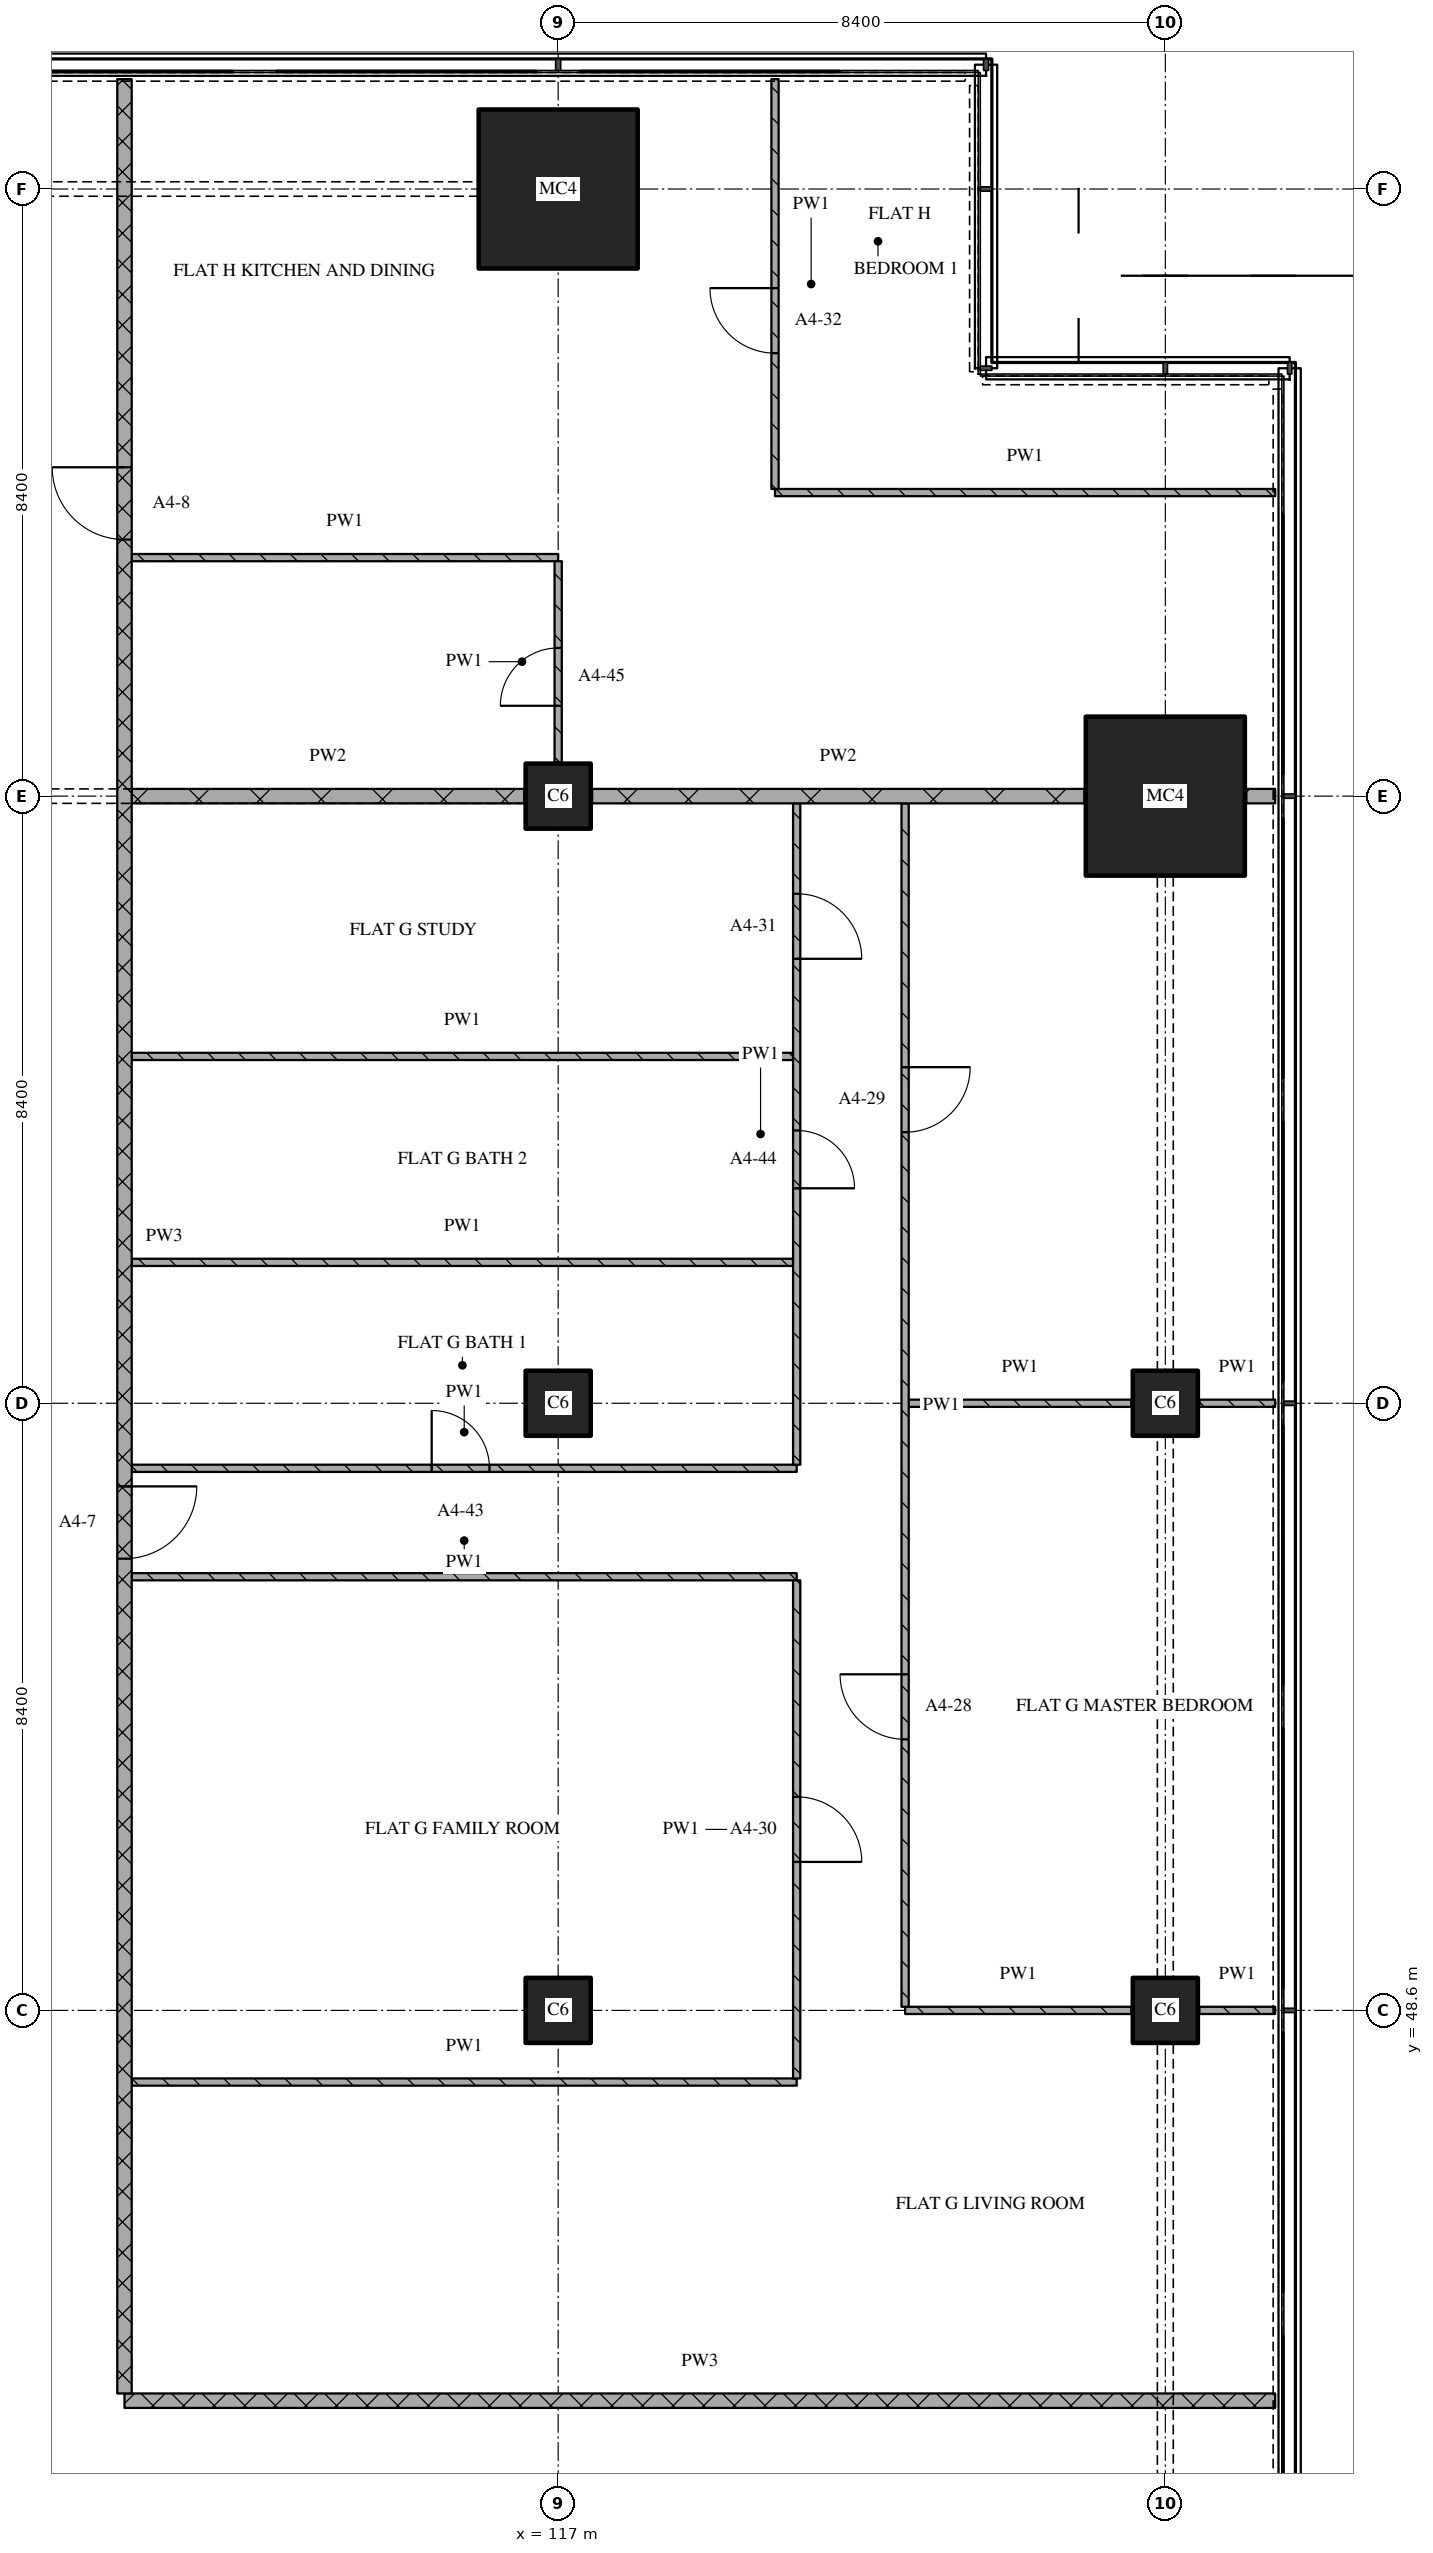
"""IFC4 building model, lengths in metres.
Left out: names, types, materials, properties, quantities, classifications, styles, units other than length and angle.
Written with IfcOpenShell. Run it as: python <this file> out.ifc"""

import sys

from ifc_helpers import new_model, si_unit, direction, frame, frame_2d, origin, origin_2d, place, context, subcontext, project, spatial, rectangle, extrude, element, fill, save


model = new_model("IFC4")
c1 = context("Model", 3, precision=1e-05, world=origin(), true_north=direction((0.0, 1.0)))
c2 = subcontext(c1, "Body", "Model", "MODEL_VIEW")
j1 = project(units=[si_unit("LENGTHUNIT", "METRE"), si_unit("PLANEANGLEUNIT", "RADIAN")], contexts=[c1])
p1 = place(None, origin())
s1 = spatial("IfcSite", under=j1, at=p1, CompositionType="ELEMENT")
p2 = place(p1, origin())
s2 = spatial("IfcBuilding", under=s1, at=p2, CompositionType="ELEMENT")
p3 = place(p2, frame((0.0, 0.0, 76.8)))
s3 = spatial("IfcBuildingStorey", under=s2, at=p3, CompositionType="ELEMENT", Elevation=76.8)
for number, where, z_axis, x_axis in (
    (1, (117.0, 48.6, 0.0), (0.0, 0.0, 1.0), (1.0, 0.0, 0.0)),
    (2, (117.0, 57.0, 0.0), (0.0, 0.0, 1.0), (1.0, 0.0, 0.0)),
    (3, (117.0, 65.4, 0.0), (0.0, 0.0, 1.0), (1.0, 0.0, 0.0)),
):
    element("IfcColumn", number, at=place(p3, frame(where, z_axis=z_axis, x_axis=x_axis)), inside=s3, PredefinedType="COLUMN", context=c2, shape_type="SweptSolid", body=[
        extrude(rectangle(XDim=0.9, YDim=0.9, at=origin_2d()), origin(), (0.0, 0.0, 1.0), 3.6),
    ])
p4 = place(p3, frame((117.0, 73.8, 0.0), z_axis=(0.0, 0.0, 1.0), x_axis=(1.0, 0.0, 0.0)))
e4 = element("IfcColumn", 4, at=p4, inside=s3, PredefinedType="COLUMN", context=c2, shape_type="SweptSolid", body=[
    extrude(rectangle(XDim=2.2, YDim=2.2, at=origin_2d()), origin(), (0.0, 0.0, 1.0), 3.6),
])
for number, where, z_axis, x_axis in (
    (5, (125.4, 48.6, 0.0), (0.0, 0.0, 1.0), (1.0, 0.0, 0.0)),
    (6, (125.4, 57.0, 0.0), (0.0, 0.0, 1.0), (1.0, 0.0, 0.0)),
):
    element("IfcColumn", number, at=place(p3, frame(where, z_axis=z_axis, x_axis=x_axis)), inside=s3, PredefinedType="COLUMN", context=c2, shape_type="SweptSolid", body=[
        extrude(rectangle(XDim=0.9, YDim=0.9, at=origin_2d()), origin(), (0.0, 0.0, 1.0), 3.6),
    ])
p5 = place(p3, frame((125.4, 65.4, 0.0), z_axis=(0.0, 0.0, 1.0), x_axis=(1.0, 0.0, 0.0)))
e7 = element("IfcColumn", 7, at=p5, inside=s3, PredefinedType="COLUMN", context=c2, shape_type="SweptSolid", body=[
    extrude(rectangle(XDim=2.2, YDim=2.2, at=origin_2d()), origin(), (0.0, 0.0, 1.0), 3.6),
])
p6 = place(p3, frame((111.0, 43.2, 0.0), z_axis=(0.0, 0.0, 1.0), x_axis=(1.0, 0.0, 0.0)))
e8 = element("IfcWall", 8, at=p6, inside=s3, PredefinedType="PARTITIONING", context=c2, shape_type="SweptSolid", body=[
    extrude(rectangle(XDim=15.92, YDim=0.2, at=frame_2d((7.96, 0.0))), origin(), (0.0, 0.0, 1.0), 3.32),
])
p7 = place(p3, frame((111.1, 47.609, 0.0), z_axis=(0.0, 0.0, 1.0), x_axis=(1.0, 0.0, 0.0)))
e9 = element("IfcWall", 9, at=p7, inside=s3, PredefinedType="PARTITIONING", context=c2, shape_type="SweptSolid", body=[
    extrude(rectangle(XDim=9.2, YDim=0.1, at=frame_2d((4.6, 0.0))), origin(), (0.0, 0.0, 1.0), 3.32),
])
p8 = place(p3, frame((121.8, 48.6, 0.0), z_axis=(0.0, 0.0, 1.0), x_axis=(1.0, 0.0, 0.0)))
e10 = element("IfcWall", 10, at=p8, inside=s3, PredefinedType="PARTITIONING", context=c2, shape_type="SweptSolid", body=[
    extrude(rectangle(XDim=3.13, YDim=0.1, at=frame_2d((1.565, 0.0))), origin(), (0.0, 0.0, 1.0), 3.32),
])
p9 = place(p3, frame((125.87, 48.6, 0.0), z_axis=(0.0, 0.0, 1.0), x_axis=(1.0, 0.0, 0.0)))
e11 = element("IfcWall", 11, at=p9, inside=s3, PredefinedType="PARTITIONING", context=c2, shape_type="SweptSolid", body=[
    extrude(rectangle(XDim=1.05, YDim=0.1, at=frame_2d((0.525, 0.0))), origin(), (0.0, 0.0, 1.0), 3.32),
])
p10 = place(p3, frame((111.1, 54.6, 0.0), z_axis=(0.0, 0.0, 1.0), x_axis=(1.0, 0.0, 0.0)))
e12 = element("IfcWall", 12, at=p10, inside=s3, PredefinedType="PARTITIONING", context=c2, shape_type="SweptSolid", body=[
    extrude(rectangle(XDim=9.2, YDim=0.1, at=frame_2d((4.6, 0.0))), origin(), (0.0, 0.0, 1.0), 3.32),
])
p11 = place(p3, frame((111.1, 56.1, 0.0), z_axis=(0.0, 0.0, 1.0), x_axis=(1.0, 0.0, 0.0)))
e13 = element("IfcWall", 13, at=p11, inside=s3, PredefinedType="PARTITIONING", context=c2, shape_type="SweptSolid", body=[
    extrude(rectangle(XDim=9.2, YDim=0.1, at=frame_2d((4.6, 0.0))), origin(), (0.0, 0.0, 1.0), 3.32),
])
p12 = place(p11, frame((4.15, 0.0, 0.0)))
e14 = element("IfcOpeningElement", 14, at=p12, cuts=e13, PredefinedType="OPENING", context=c2, shape_type="SweptSolid", body=[
    extrude(rectangle(XDim=0.8, YDim=2.1, at=frame_2d((0.4, 1.05))), frame((0.0, 0.06, 0.0), z_axis=(0.0, -1.0, 0.0), x_axis=(1.0, 0.0, 0.0)), (0.0, 0.0, 1.0), 0.12),
])
p13 = place(p3, frame((121.85, 57.0, 0.0), z_axis=(0.0, 0.0, 1.0), x_axis=(1.0, 0.0, 0.0)))
e15 = element("IfcWall", 15, at=p13, inside=s3, PredefinedType="PARTITIONING", context=c2, shape_type="SweptSolid", body=[
    extrude(rectangle(XDim=3.08, YDim=0.1, at=frame_2d((1.54, 0.0))), origin(), (0.0, 0.0, 1.0), 3.32),
])
p14 = place(p3, frame((125.87, 57.0, 0.0), z_axis=(0.0, 0.0, 1.0), x_axis=(1.0, 0.0, 0.0)))
e16 = element("IfcWall", 16, at=p14, inside=s3, PredefinedType="PARTITIONING", context=c2, shape_type="SweptSolid", body=[
    extrude(rectangle(XDim=1.05, YDim=0.1, at=frame_2d((0.525, 0.0))), origin(), (0.0, 0.0, 1.0), 3.32),
])
for number, where, z_axis, x_axis in (
    (17, (111.1, 58.949, 0.0), (0.0, 0.0, 1.0), (1.0, 0.0, 0.0)),
    (18, (111.1, 61.799, 0.0), (0.0, 0.0, 1.0), (1.0, 0.0, 0.0)),
):
    element("IfcWall", number, at=place(p3, frame(where, z_axis=z_axis, x_axis=x_axis)), inside=s3, PredefinedType="PARTITIONING", context=c2, shape_type="SweptSolid", body=[
        extrude(rectangle(XDim=9.15, YDim=0.1, at=frame_2d((4.575, 0.0))), origin(), (0.0, 0.0, 1.0), 3.32),
    ])
p15 = place(p3, frame((111.1, 65.4, 0.0), z_axis=(0.0, 0.0, 1.0), x_axis=(1.0, 0.0, 0.0)))
e19 = element("IfcWall", 19, at=p15, inside=s3, PredefinedType="PARTITIONING", context=c2, shape_type="SweptSolid", body=[
    extrude(rectangle(XDim=5.43, YDim=0.2, at=frame_2d((2.715, 0.0))), origin(), (0.0, 0.0, 1.0), 2.82),
])
p16 = place(p3, frame((117.47, 65.4, 0.0), z_axis=(0.0, 0.0, 1.0), x_axis=(1.0, 0.0, 0.0)))
e20 = element("IfcWall", 20, at=p16, inside=s3, PredefinedType="PARTITIONING", context=c2, shape_type="SweptSolid", body=[
    extrude(rectangle(XDim=6.81, YDim=0.2, at=frame_2d((3.405, 0.0))), origin(), (0.0, 0.0, 1.0), 3.32),
])
p17 = place(p3, frame((126.52, 65.4, 0.0), z_axis=(0.0, 0.0, 1.0), x_axis=(1.0, 0.0, 0.0)))
e21 = element("IfcWall", 21, at=p17, inside=s3, PredefinedType="PARTITIONING", context=c2, shape_type="SweptSolid", body=[
    extrude(rectangle(XDim=0.4, YDim=0.2, at=frame_2d((0.2, 0.0))), origin(), (0.0, 0.0, 1.0), 3.32),
])
p18 = place(p3, frame((111.1, 68.7, 0.0), z_axis=(0.0, 0.0, 1.0), x_axis=(1.0, 0.0, 0.0)))
e22 = element("IfcWall", 22, at=p18, inside=s3, PredefinedType="PARTITIONING", context=c2, shape_type="SweptSolid", body=[
    extrude(rectangle(XDim=5.9, YDim=0.1, at=frame_2d((2.95, 0.0))), origin(), (0.0, 0.0, 1.0), 3.32),
])
p19 = place(p3, frame((120.0, 69.6, 0.0), z_axis=(0.0, 0.0, 1.0), x_axis=(1.0, 0.0, 0.0)))
e23 = element("IfcWall", 23, at=p19, inside=s3, PredefinedType="PARTITIONING", context=c2, shape_type="SweptSolid", body=[
    extrude(rectangle(XDim=6.92, YDim=0.1, at=frame_2d((3.46, 0.0))), origin(), (0.0, 0.0, 1.0), 3.32),
])
p20 = place(p3, frame((111.0, 75.32, 0.0), z_axis=(0.0, 0.0, 1.0), x_axis=(0.0, -1.0, 0.0)))
e24 = element("IfcWall", 24, at=p20, inside=s3, PredefinedType="PARTITIONING", context=c2, shape_type="SweptSolid", body=[
    extrude(rectangle(XDim=32.02, YDim=0.2, at=frame_2d((16.01, 0.0))), origin(), (0.0, 0.0, 1.0), 3.32),
])
p21 = place(p20, frame((5.37, 0.0, 0.0)))
e25 = element("IfcOpeningElement", 25, at=p21, cuts=e24, PredefinedType="OPENING", context=c2, shape_type="SweptSolid", body=[
    extrude(rectangle(XDim=1.0, YDim=2.1, at=frame_2d((0.5, 1.05))), frame((0.0, 0.11, 0.0), z_axis=(0.0, -1.0, 0.0), x_axis=(1.0, 0.0, 0.0)), (0.0, 0.0, 1.0), 0.22),
])
p22 = place(p20, frame((19.47, 0.0, 0.0)))
e26 = element("IfcOpeningElement", 26, at=p22, cuts=e24, PredefinedType="OPENING", context=c2, shape_type="SweptSolid", body=[
    extrude(rectangle(XDim=1.0, YDim=2.1, at=frame_2d((0.5, 1.05))), frame((0.0, 0.11, 0.0), z_axis=(0.0, -1.0, 0.0), x_axis=(1.0, 0.0, 0.0)), (0.0, 0.0, 1.0), 0.22),
])
p23 = place(p3, frame((117.0, 65.87, 0.0), z_axis=(0.0, 0.0, 1.0), x_axis=(0.0, 1.0, 0.0)))
e27 = element("IfcWall", 27, at=p23, inside=s3, PredefinedType="PARTITIONING", context=c2, shape_type="SweptSolid", body=[
    extrude(rectangle(XDim=2.78, YDim=0.1, at=frame_2d((1.39, 0.0))), origin(), (0.0, 0.0, 1.0), 3.32),
])
p24 = place(p23, frame((0.78, 0.0, 0.0)))
e28 = element("IfcOpeningElement", 28, at=p24, cuts=e27, PredefinedType="OPENING", context=c2, shape_type="SweptSolid", body=[
    extrude(rectangle(XDim=0.8, YDim=2.1, at=frame_2d((0.4, 1.05))), frame((0.0, 0.06, 0.0), z_axis=(0.0, -1.0, 0.0), x_axis=(1.0, 0.0, 0.0)), (0.0, 0.0, 1.0), 0.12),
])
p25 = place(p3, frame((120.0, 75.32, 0.0), z_axis=(0.0, 0.0, 1.0), x_axis=(0.0, -1.0, 0.0)))
e29 = element("IfcWall", 29, at=p25, inside=s3, PredefinedType="PARTITIONING", context=c2, shape_type="SweptSolid", body=[
    extrude(rectangle(XDim=5.67, YDim=0.1, at=frame_2d((2.835, 0.0))), origin(), (0.0, 0.0, 1.0), 3.32),
])
p26 = place(p25, frame((2.891, 0.0, 0.0)))
e30 = element("IfcOpeningElement", 30, at=p26, cuts=e29, PredefinedType="OPENING", context=c2, shape_type="SweptSolid", body=[
    extrude(rectangle(XDim=0.9, YDim=2.1, at=frame_2d((0.45, 1.05))), frame((0.0, 0.06, 0.0), z_axis=(0.0, -1.0, 0.0), x_axis=(1.0, 0.0, 0.0)), (0.0, 0.0, 1.0), 0.12),
])
p27 = place(p3, frame((120.3, 47.659, 0.0), z_axis=(0.0, 0.0, 1.0), x_axis=(0.0, 1.0, 0.0)))
e31 = element("IfcWall", 31, at=p27, inside=s3, PredefinedType="PARTITIONING", context=c2, shape_type="SweptSolid", body=[
    extrude(rectangle(XDim=6.891, YDim=0.1, at=frame_2d((3.446, 0.0))), origin(), (0.0, 0.0, 1.0), 3.32),
])
p28 = place(p27, frame((2.996, 0.0, 0.0)))
e32 = element("IfcOpeningElement", 32, at=p28, cuts=e31, PredefinedType="OPENING", context=c2, shape_type="SweptSolid", body=[
    extrude(rectangle(XDim=0.9, YDim=2.1, at=frame_2d((0.45, 1.05))), frame((0.0, 0.06, 0.0), z_axis=(0.0, -1.0, 0.0), x_axis=(1.0, 0.0, 0.0)), (0.0, 0.0, 1.0), 0.12),
])
p29 = place(p3, frame((120.3, 56.15, 0.0), z_axis=(0.0, 0.0, 1.0), x_axis=(0.0, 1.0, 0.0)))
e33 = element("IfcWall", 33, at=p29, inside=s3, PredefinedType="PARTITIONING", context=c2, shape_type="SweptSolid", body=[
    extrude(rectangle(XDim=9.15, YDim=0.1, at=frame_2d((4.575, 0.0))), origin(), (0.0, 0.0, 1.0), 3.32),
])
p30 = place(p29, frame((3.824, 0.0, 0.0)))
e34 = element("IfcOpeningElement", 34, at=p30, cuts=e33, PredefinedType="OPENING", context=c2, shape_type="SweptSolid", body=[
    extrude(rectangle(XDim=0.8, YDim=2.1, at=frame_2d((0.4, 1.05))), frame((0.0, 0.06, 0.0), z_axis=(0.0, -1.0, 0.0), x_axis=(1.0, 0.0, 0.0)), (0.0, 0.0, 1.0), 0.12),
])
p31 = place(p29, frame((7.0, 0.0, 0.0)))
e35 = element("IfcOpeningElement", 35, at=p31, cuts=e33, PredefinedType="OPENING", context=c2, shape_type="SweptSolid", body=[
    extrude(rectangle(XDim=0.9, YDim=2.1, at=frame_2d((0.45, 1.05))), frame((0.0, 0.06, 0.0), z_axis=(0.0, -1.0, 0.0), x_axis=(1.0, 0.0, 0.0)), (0.0, 0.0, 1.0), 0.12),
])
p32 = place(p3, frame((121.8, 65.3, 0.0), z_axis=(0.0, 0.0, 1.0), x_axis=(0.0, -1.0, 0.0)))
e36 = element("IfcWall", 36, at=p32, inside=s3, PredefinedType="PARTITIONING", context=c2, shape_type="SweptSolid", body=[
    extrude(rectangle(XDim=16.65, YDim=0.1, at=frame_2d((8.325, 0.0))), origin(), (0.0, 0.0, 1.0), 3.32),
])
p33 = place(p32, frame((3.65, 0.0, 0.0)))
e37 = element("IfcOpeningElement", 37, at=p33, cuts=e36, PredefinedType="OPENING", context=c2, shape_type="SweptSolid", body=[
    extrude(rectangle(XDim=0.9, YDim=2.1, at=frame_2d((0.45, 1.05))), frame((0.0, 0.06, 0.0), z_axis=(0.0, -1.0, 0.0), x_axis=(1.0, 0.0, 0.0)), (0.0, 0.0, 1.0), 0.12),
])
p34 = place(p32, frame((12.05, 0.0, 0.0)))
e38 = element("IfcOpeningElement", 38, at=p34, cuts=e36, PredefinedType="OPENING", context=c2, shape_type="SweptSolid", body=[
    extrude(rectangle(XDim=0.9, YDim=2.1, at=frame_2d((0.45, 1.05))), frame((0.0, 0.06, 0.0), z_axis=(0.0, -1.0, 0.0), x_axis=(1.0, 0.0, 0.0)), (0.0, 0.0, 1.0), 0.12),
])
p35 = place(p12, origin())
e39 = element("IfcDoor", 39, at=p35, inside=s3, OperationType="SINGLE_SWING_LEFT", PredefinedType="DOOR", context=c2, shape_type="SweptSolid", body=[
    extrude(rectangle(XDim=0.8, YDim=2.1, at=frame_2d((0.4, 1.05))), frame((0.0, 0.025, 0.0), z_axis=(0.0, -1.0, 0.0), x_axis=(1.0, 0.0, 0.0)), (0.0, 0.0, 1.0), 0.05),
])
fill(e14, e39)
p36 = place(p21, origin())
e40 = element("IfcDoor", 40, at=p36, inside=s3, OperationType="SINGLE_SWING_RIGHT", PredefinedType="DOOR", context=c2, shape_type="SweptSolid", body=[
    extrude(rectangle(XDim=1.0, YDim=2.1, at=frame_2d((0.5, 1.05))), frame((0.0, 0.025, 0.0), z_axis=(0.0, -1.0, 0.0), x_axis=(1.0, 0.0, 0.0)), (0.0, 0.0, 1.0), 0.05),
])
fill(e25, e40)
p37 = place(p22, origin())
e41 = element("IfcDoor", 41, at=p37, inside=s3, OperationType="SINGLE_SWING_LEFT", PredefinedType="DOOR", context=c2, shape_type="SweptSolid", body=[
    extrude(rectangle(XDim=1.0, YDim=2.1, at=frame_2d((0.5, 1.05))), frame((0.0, 0.025, 0.0), z_axis=(0.0, -1.0, 0.0), x_axis=(1.0, 0.0, 0.0)), (0.0, 0.0, 1.0), 0.05),
])
fill(e26, e41)
p38 = place(p24, origin())
e42 = element("IfcDoor", 42, at=p38, inside=s3, OperationType="SINGLE_SWING_LEFT", PredefinedType="DOOR", context=c2, shape_type="SweptSolid", body=[
    extrude(rectangle(XDim=0.8, YDim=2.1, at=frame_2d((0.4, 1.05))), frame((0.0, 0.025, 0.0), z_axis=(0.0, -1.0, 0.0), x_axis=(1.0, 0.0, 0.0)), (0.0, 0.0, 1.0), 0.05),
])
fill(e28, e42)
p39 = place(p26, origin())
e43 = element("IfcDoor", 43, at=p39, inside=s3, OperationType="SINGLE_SWING_RIGHT", PredefinedType="DOOR", context=c2, shape_type="SweptSolid", body=[
    extrude(rectangle(XDim=0.9, YDim=2.1, at=frame_2d((0.45, 1.05))), frame((0.0, 0.025, 0.0), z_axis=(0.0, -1.0, 0.0), x_axis=(1.0, 0.0, 0.0)), (0.0, 0.0, 1.0), 0.05),
])
fill(e30, e43)
p40 = place(p28, origin())
e44 = element("IfcDoor", 44, at=p40, inside=s3, OperationType="SINGLE_SWING_RIGHT", PredefinedType="DOOR", context=c2, shape_type="SweptSolid", body=[
    extrude(rectangle(XDim=0.9, YDim=2.1, at=frame_2d((0.45, 1.05))), frame((0.0, 0.025, 0.0), z_axis=(0.0, -1.0, 0.0), x_axis=(1.0, 0.0, 0.0)), (0.0, 0.0, 1.0), 0.05),
])
fill(e32, e44)
p41 = place(p30, origin())
e45 = element("IfcDoor", 45, at=p41, inside=s3, OperationType="SINGLE_SWING_RIGHT", PredefinedType="DOOR", context=c2, shape_type="SweptSolid", body=[
    extrude(rectangle(XDim=0.8, YDim=2.1, at=frame_2d((0.4, 1.05))), frame((0.0, 0.025, 0.0), z_axis=(0.0, -1.0, 0.0), x_axis=(1.0, 0.0, 0.0)), (0.0, 0.0, 1.0), 0.05),
])
fill(e34, e45)
p42 = place(p31, origin())
e46 = element("IfcDoor", 46, at=p42, inside=s3, OperationType="SINGLE_SWING_RIGHT", PredefinedType="DOOR", context=c2, shape_type="SweptSolid", body=[
    extrude(rectangle(XDim=0.9, YDim=2.1, at=frame_2d((0.45, 1.05))), frame((0.0, 0.025, 0.0), z_axis=(0.0, -1.0, 0.0), x_axis=(1.0, 0.0, 0.0)), (0.0, 0.0, 1.0), 0.05),
])
fill(e35, e46)
p43 = place(p33, origin())
e47 = element("IfcDoor", 47, at=p43, inside=s3, OperationType="SINGLE_SWING_LEFT", PredefinedType="DOOR", context=c2, shape_type="SweptSolid", body=[
    extrude(rectangle(XDim=0.9, YDim=2.1, at=frame_2d((0.45, 1.05))), frame((0.0, 0.025, 0.0), z_axis=(0.0, -1.0, 0.0), x_axis=(1.0, 0.0, 0.0)), (0.0, 0.0, 1.0), 0.05),
])
fill(e37, e47)
p44 = place(p34, origin())
e48 = element("IfcDoor", 48, at=p44, inside=s3, OperationType="SINGLE_SWING_RIGHT", PredefinedType="DOOR", context=c2, shape_type="SweptSolid", body=[
    extrude(rectangle(XDim=0.9, YDim=2.1, at=frame_2d((0.45, 1.05))), frame((0.0, 0.025, 0.0), z_axis=(0.0, -1.0, 0.0), x_axis=(1.0, 0.0, 0.0)), (0.0, 0.0, 1.0), 0.05),
])
fill(e38, e48)
save(model, sys.argv[1])
